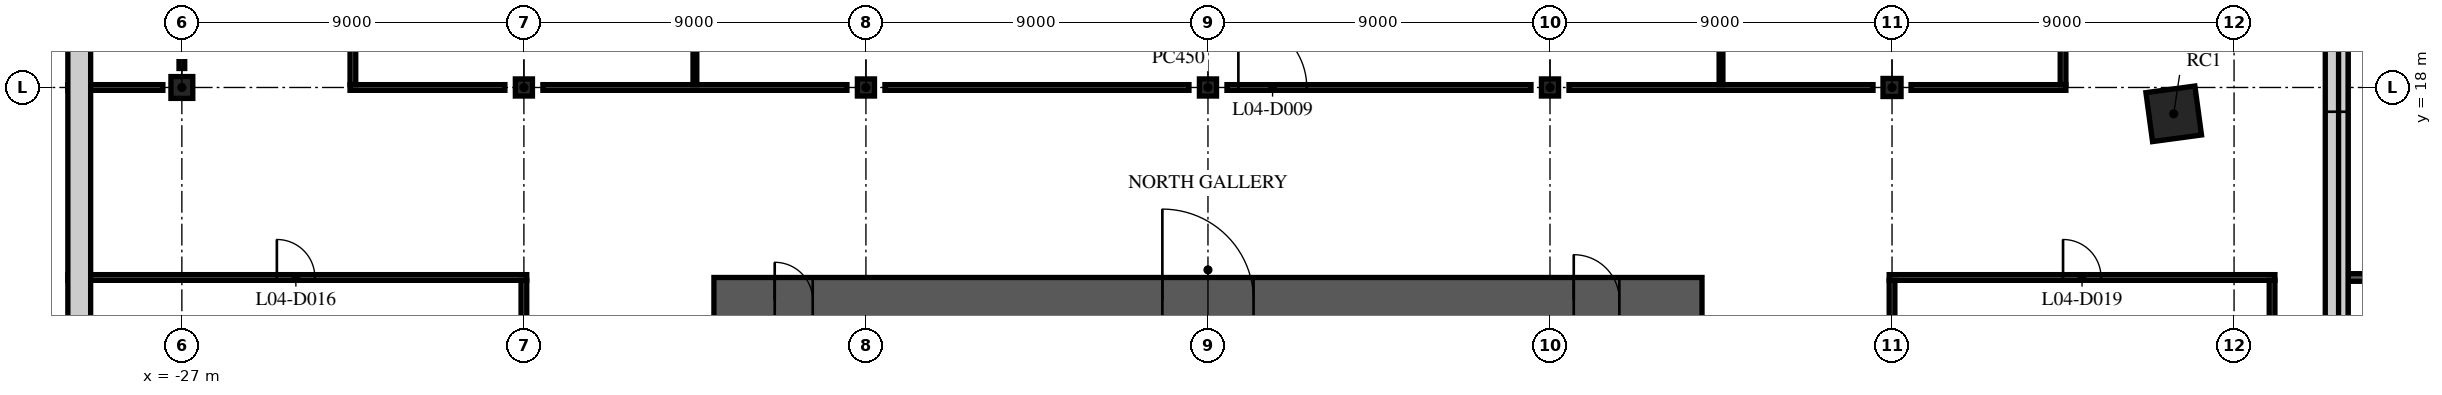
"""IFC4 building model, lengths in metres.
Left out: names, types, materials, properties, quantities, classifications, styles, units other than length and angle.
Written with IfcOpenShell. Run it as: python <this file> out.ifc"""

import sys

from ifc_helpers import new_model, si_unit, direction, frame, frame_2d, origin, origin_2d, place, context, subcontext, project, spatial, rectangle, extrude, element, fill, save


model = new_model("IFC4")
c1 = context("Model", 3, precision=1e-05, world=origin(), true_north=direction((0.0, 1.0)))
c2 = subcontext(c1, "Body", "Model", "MODEL_VIEW")
j1 = project(units=[si_unit("LENGTHUNIT", "METRE"), si_unit("PLANEANGLEUNIT", "RADIAN")], contexts=[c1])
p1 = place(None, origin())
s1 = spatial("IfcSite", under=j1, at=p1, CompositionType="ELEMENT")
p2 = place(p1, origin())
s2 = spatial("IfcBuilding", under=s1, at=p2, CompositionType="ELEMENT")
p3 = place(p2, frame((0.0, 0.0, 18.0)))
s3 = spatial("IfcBuildingStorey", under=s2, at=p3, CompositionType="ELEMENT", Elevation=18.0)
p4 = place(p3, frame((-27.0, 18.0, 0.0), z_axis=(0.0, 0.0, 1.0), x_axis=(1.0, 0.0, 0.0)))
e1 = element("IfcColumn", 1, at=p4, inside=s3, PredefinedType="COLUMN", context=c2, shape_type="SweptSolid", body=[
    extrude(rectangle(XDim=0.575, YDim=0.575, at=origin_2d()), origin(), (0.0, 0.0, 1.0), 4.5),
])
for number, where, z_axis, x_axis in (
    (2, (-18.0, 18.0, 0.0), (0.0, 0.0, 1.0), (1.0, 0.0, 0.0)),
    (3, (-9.0, 18.0, 0.0), (0.0, 0.0, 1.0), (1.0, 0.0, 0.0)),
    (4, (0.0, 18.0, 0.0), (0.0, 0.0, 1.0), (1.0, 0.0, 0.0)),
    (5, (9.0, 18.0, 0.0), (0.0, 0.0, 1.0), (1.0, 0.0, 0.0)),
):
    element("IfcColumn", number, at=place(p3, frame(where, z_axis=z_axis, x_axis=x_axis)), inside=s3, PredefinedType="COLUMN", context=c2, shape_type="SweptSolid", body=[
        extrude(rectangle(XDim=0.45, YDim=0.45, at=origin_2d()), origin(), (0.0, 0.0, 1.0), 4.5),
    ])
p5 = place(p3, frame((18.0, 18.0, 0.0), z_axis=(0.0, 0.0, 1.0), x_axis=(1.0, 0.0, 0.0)))
e6 = element("IfcColumn", 6, at=p5, inside=s3, PredefinedType="COLUMN", context=c2, shape_type="SweptSolid", body=[
    extrude(rectangle(XDim=0.475, YDim=0.475, at=origin_2d()), origin(), (0.0, 0.0, 1.0), 4.5),
])
p6 = place(p3, frame((25.412, 17.307, 0.0), z_axis=(0.0, 0.0, 1.0), x_axis=(0.991001197216, 0.133853005627, 0.0)))
e7 = element("IfcColumn", 7, at=p6, inside=s3, PredefinedType="COLUMN", context=c2, shape_type="SweptSolid", body=[
    extrude(rectangle(XDim=1.3, YDim=1.3, at=origin_2d()), origin(), (0.0, 0.0, 1.0), 4.5),
])
p7 = place(p3, frame((-13.0, 12.4, 0.0), z_axis=(0.0, 0.0, 1.0), x_axis=(1.0, 0.0, 0.0)))
e8 = element("IfcWall", 8, at=p7, inside=s3, PredefinedType="SHEAR", context=c2, shape_type="SweptSolid", body=[
    extrude(rectangle(XDim=26.0, YDim=1.2, at=frame_2d((13.0, 0.0))), origin(), (0.0, 0.0, 1.0), 4.05),
])
p8 = place(p7, frame((11.8, 0.0, 0.0)))
e9 = element("IfcOpeningElement", 9, at=p8, cuts=e8, PredefinedType="OPENING", context=c2, shape_type="SweptSolid", body=[
    extrude(rectangle(XDim=2.4, YDim=2.4, at=frame_2d((1.2, 1.2))), frame((0.0, 0.61, 0.0), z_axis=(0.0, -1.0, 0.0), x_axis=(1.0, 0.0, 0.0)), (0.0, 0.0, 1.0), 1.22),
])
p9 = place(p7, frame((22.625, 0.0, 0.0)))
e10 = element("IfcOpeningElement", 10, at=p9, cuts=e8, PredefinedType="OPENING", context=c2, shape_type="SweptSolid", body=[
    extrude(rectangle(XDim=1.2, YDim=2.1, at=frame_2d((0.6, 1.05))), frame((0.0, 0.61, 0.0), z_axis=(0.0, -1.0, 0.0), x_axis=(1.0, 0.0, 0.0)), (0.0, 0.0, 1.0), 1.22),
])
p10 = place(p7, frame((1.6, 0.0, 0.0)))
e11 = element("IfcOpeningElement", 11, at=p10, cuts=e8, PredefinedType="OPENING", context=c2, shape_type="SweptSolid", body=[
    extrude(rectangle(XDim=1.0, YDim=2.1, at=frame_2d((0.5, 1.05))), frame((0.0, 0.61, 0.0), z_axis=(0.0, -1.0, 0.0), x_axis=(1.0, 0.0, 0.0)), (0.0, 0.0, 1.0), 1.22),
])
p11 = place(p3, frame((-30.0, 13.0, 0.0), z_axis=(0.0, 0.0, 1.0), x_axis=(1.0, 0.0, 0.0)))
e12 = element("IfcWall", 12, at=p11, inside=s3, PredefinedType="PARTITIONING", context=c2, shape_type="SweptSolid", body=[
    extrude(rectangle(XDim=12.075, YDim=0.15, at=frame_2d((6.038, 0.0))), origin(), (0.0, 0.0, 1.0), 3.23),
])
p12 = place(p11, frame((5.5, 0.0, 0.0)))
e13 = element("IfcOpeningElement", 13, at=p12, cuts=e12, PredefinedType="OPENING", context=c2, shape_type="SweptSolid", body=[
    extrude(rectangle(XDim=1.0, YDim=2.1, at=frame_2d((0.5, 1.05))), frame((0.0, 0.085, 0.0), z_axis=(0.0, -1.0, 0.0), x_axis=(1.0, 0.0, 0.0)), (0.0, 0.0, 1.0), 0.17),
])
p13 = place(p3, frame((17.925, 13.0, 0.0), z_axis=(0.0, 0.0, 1.0), x_axis=(1.0, 0.0, 0.0)))
e14 = element("IfcWall", 14, at=p13, inside=s3, PredefinedType="PARTITIONING", context=c2, shape_type="SweptSolid", body=[
    extrude(rectangle(XDim=10.15, YDim=0.15, at=frame_2d((5.075, 0.0))), origin(), (0.0, 0.0, 1.0), 3.23),
])
p14 = place(p13, frame((4.575, 0.0, 0.0)))
e15 = element("IfcOpeningElement", 15, at=p14, cuts=e14, PredefinedType="OPENING", context=c2, shape_type="SweptSolid", body=[
    extrude(rectangle(XDim=1.0, YDim=2.1, at=frame_2d((0.5, 1.05))), frame((0.0, 0.085, 0.0), z_axis=(0.0, -1.0, 0.0), x_axis=(1.0, 0.0, 0.0)), (0.0, 0.0, 1.0), 0.17),
])
p15 = place(p3, frame((30.0, 13.0, 0.0), z_axis=(0.0, 0.0, 1.0), x_axis=(1.0, 0.0, 0.0)))
e16 = element("IfcWall", 16, at=p15, inside=s3, PredefinedType="PARTITIONING", context=c2, shape_type="SweptSolid", body=[
    extrude(rectangle(XDim=6.0, YDim=0.2, at=frame_2d((3.0, 0.0))), origin(), (0.0, 0.0, 1.0), 4.05),
])
p16 = place(p3, frame((-30.0, 18.0, 0.0), z_axis=(0.0, 0.0, 1.0), x_axis=(1.0, 0.0, 0.0)))
e17 = element("IfcWall", 17, at=p16, inside=s3, PredefinedType="PARTITIONING", context=c2, shape_type="SweptSolid", body=[
    extrude(rectangle(XDim=2.5, YDim=0.15, at=frame_2d((1.25, 0.0))), origin(), (0.0, 0.0, 1.0), 3.23),
])
p17 = place(p3, frame((-22.575, 18.0, 0.0), z_axis=(0.0, 0.0, 1.0), x_axis=(1.0, 0.0, 0.0)))
e18 = element("IfcWall", 18, at=p17, inside=s3, PredefinedType="PARTITIONING", context=c2, shape_type="SweptSolid", body=[
    extrude(rectangle(XDim=4.075, YDim=0.15, at=frame_2d((2.038, 0.0))), origin(), (0.0, 0.0, 1.0), 3.53),
])
for number, where, z_axis, x_axis in (
    (19, (-17.5, 18.0, 0.0), (0.0, 0.0, 1.0), (1.0, 0.0, 0.0)),
    (20, (-8.5, 18.0, 0.0), (0.0, 0.0, 1.0), (1.0, 0.0, 0.0)),
):
    element("IfcWall", number, at=place(p3, frame(where, z_axis=z_axis, x_axis=x_axis)), inside=s3, PredefinedType="PARTITIONING", context=c2, shape_type="SweptSolid", body=[
        extrude(rectangle(XDim=8.0, YDim=0.15, at=frame_2d((4.0, 0.0))), origin(), (0.0, 0.0, 1.0), 3.53),
    ])
p18 = place(p3, frame((0.5, 18.0, 0.0), z_axis=(0.0, 0.0, 1.0), x_axis=(1.0, 0.0, 0.0)))
e21 = element("IfcWall", 21, at=p18, inside=s3, PredefinedType="PARTITIONING", context=c2, shape_type="SweptSolid", body=[
    extrude(rectangle(XDim=8.0, YDim=0.15, at=frame_2d((4.0, 0.0))), origin(), (0.0, 0.0, 1.0), 3.53),
])
p19 = place(p18, frame((0.3, 0.0, 0.0)))
e22 = element("IfcOpeningElement", 22, at=p19, cuts=e21, PredefinedType="OPENING", context=c2, shape_type="SweptSolid", body=[
    extrude(rectangle(XDim=1.8, YDim=2.1, at=frame_2d((0.9, 1.05))), frame((0.0, 0.085, 0.0), z_axis=(0.0, -1.0, 0.0), x_axis=(1.0, 0.0, 0.0)), (0.0, 0.0, 1.0), 0.17),
])
p20 = place(p3, frame((9.5, 18.0, 0.0), z_axis=(0.0, 0.0, 1.0), x_axis=(1.0, 0.0, 0.0)))
e23 = element("IfcWall", 23, at=p20, inside=s3, PredefinedType="PARTITIONING", context=c2, shape_type="SweptSolid", body=[
    extrude(rectangle(XDim=8.0, YDim=0.15, at=frame_2d((4.0, 0.0))), origin(), (0.0, 0.0, 1.0), 3.53),
])
p21 = place(p3, frame((18.5, 18.0, 0.0), z_axis=(0.0, 0.0, 1.0), x_axis=(1.0, 0.0, 0.0)))
e24 = element("IfcWall", 24, at=p21, inside=s3, PredefinedType="PARTITIONING", context=c2, shape_type="SweptSolid", body=[
    extrude(rectangle(XDim=4.075, YDim=0.15, at=frame_2d((2.038, 0.0))), origin(), (0.0, 0.0, 1.0), 3.53),
])
p22 = place(p3, frame((-27.0, 18.5, 0.0), z_axis=(0.0, 0.0, 1.0), x_axis=(0.0, 1.0, 0.0)))
e25 = element("IfcWall", 25, at=p22, inside=s3, PredefinedType="PARTITIONING", context=c2, shape_type="SweptSolid", body=[
    extrude(rectangle(XDim=1.242, YDim=0.15, at=frame_2d((0.621, 0.0))), origin(), (0.0, 0.0, 1.0), 4.05),
])
p23 = place(p3, frame((-22.5, 18.075, 0.0), z_axis=(0.0, 0.0, 1.0), x_axis=(0.0, 1.0, 0.0)))
e26 = element("IfcWall", 26, at=p23, inside=s3, PredefinedType="PARTITIONING", context=c2, shape_type="SweptSolid", body=[
    extrude(rectangle(XDim=11.925, YDim=0.15, at=frame_2d((5.962, 0.0))), origin(), (0.0, 0.0, 1.0), 3.23),
])
p24 = place(p23, frame((5.425, 0.0, 0.0)))
e27 = element("IfcOpeningElement", 27, at=p24, cuts=e26, PredefinedType="OPENING", context=c2, shape_type="SweptSolid", body=[
    extrude(rectangle(XDim=1.0, YDim=2.1, at=frame_2d((0.5, 1.05))), frame((0.0, 0.085, 0.0), z_axis=(0.0, -1.0, 0.0), x_axis=(1.0, 0.0, 0.0)), (0.0, 0.0, 1.0), 0.17),
])
p25 = place(p3, frame((-18.0, 9.5, 0.0), z_axis=(0.0, 0.0, 1.0), x_axis=(0.0, 1.0, 0.0)))
e28 = element("IfcWall", 28, at=p25, inside=s3, PredefinedType="PARTITIONING", context=c2, shape_type="SweptSolid", body=[
    extrude(rectangle(XDim=3.425, YDim=0.15, at=frame_2d((1.712, 0.0))), origin(), (0.0, 0.0, 1.0), 3.53),
])
for number, where, z_axis, x_axis in (
    (29, (-13.5, 18.075, 0.0), (0.0, 0.0, 1.0), (0.0, 1.0, 0.0)),
    (30, (13.5, 18.075, 0.0), (0.0, 0.0, 1.0), (0.0, 1.0, 0.0)),
):
    element("IfcWall", number, at=place(p3, frame(where, z_axis=z_axis, x_axis=x_axis)), inside=s3, PredefinedType="PARTITIONING", context=c2, shape_type="SweptSolid", body=[
        extrude(rectangle(XDim=11.925, YDim=0.1, at=frame_2d((5.962, 0.0))), origin(), (0.0, 0.0, 1.0), 3.23),
    ])
p26 = place(p3, frame((18.0, 9.5, 0.0), z_axis=(0.0, 0.0, 1.0), x_axis=(0.0, 1.0, 0.0)))
e31 = element("IfcWall", 31, at=p26, inside=s3, PredefinedType="PARTITIONING", context=c2, shape_type="SweptSolid", body=[
    extrude(rectangle(XDim=3.425, YDim=0.15, at=frame_2d((1.712, 0.0))), origin(), (0.0, 0.0, 1.0), 3.53),
])
p27 = place(p3, frame((22.5, 18.075, 0.0), z_axis=(0.0, 0.0, 1.0), x_axis=(0.0, 1.0, 0.0)))
e32 = element("IfcWall", 32, at=p27, inside=s3, PredefinedType="PARTITIONING", context=c2, shape_type="SweptSolid", body=[
    extrude(rectangle(XDim=11.925, YDim=0.15, at=frame_2d((5.962, 0.0))), origin(), (0.0, 0.0, 1.0), 3.23),
])
p28 = place(p27, frame((5.425, 0.0, 0.0)))
e33 = element("IfcOpeningElement", 33, at=p28, cuts=e32, PredefinedType="OPENING", context=c2, shape_type="SweptSolid", body=[
    extrude(rectangle(XDim=1.0, YDim=2.1, at=frame_2d((0.5, 1.05))), frame((0.0, 0.085, 0.0), z_axis=(0.0, -1.0, 0.0), x_axis=(1.0, 0.0, 0.0)), (0.0, 0.0, 1.0), 0.17),
])
p29 = place(p3, frame((28.0, 4.075, 0.0), z_axis=(0.0, 0.0, 1.0), x_axis=(0.0, 1.0, 0.0)))
e34 = element("IfcWall", 34, at=p29, inside=s3, PredefinedType="PARTITIONING", context=c2, shape_type="SweptSolid", body=[
    extrude(rectangle(XDim=8.85, YDim=0.15, at=frame_2d((4.425, 0.0))), origin(), (0.0, 0.0, 1.0), 4.05),
])
p30 = place(p3, frame((29.7, 3.65, 0.0), z_axis=(0.0, 0.0, 1.0), x_axis=(0.0, 1.0, 0.0)))
e35 = element("IfcWall", 35, at=p30, inside=s3, PredefinedType="STANDARD", context=c2, shape_type="SweptSolid", body=[
    extrude(rectangle(XDim=26.35, YDim=0.6, at=frame_2d((13.175, 0.0))), origin(), (0.0, 0.0, 1.0), 4.05),
])
p31 = place(p30, frame((4.481, 0.0, 0.9)))
e36 = element("IfcOpeningElement", 36, at=p31, cuts=e35, PredefinedType="OPENING", context=c2, shape_type="SweptSolid", body=[
    extrude(rectangle(XDim=2.2, YDim=3.0, at=frame_2d((1.1, 1.5))), frame((0.0, 0.31, 0.0), z_axis=(0.0, -1.0, 0.0), x_axis=(1.0, 0.0, 0.0)), (0.0, 0.0, 1.0), 0.62),
])
p32 = place(p30, frame((13.711, 0.0, 0.9)))
e37 = element("IfcOpeningElement", 37, at=p32, cuts=e35, PredefinedType="OPENING", context=c2, shape_type="SweptSolid", body=[
    extrude(rectangle(XDim=2.2, YDim=3.0, at=frame_2d((1.1, 1.5))), frame((0.0, 0.31, 0.0), z_axis=(0.0, -1.0, 0.0), x_axis=(1.0, 0.0, 0.0)), (0.0, 0.0, 1.0), 0.62),
])
p33 = place(p30, frame((22.942, 0.0, 0.9)))
e38 = element("IfcOpeningElement", 38, at=p33, cuts=e35, PredefinedType="OPENING", context=c2, shape_type="SweptSolid", body=[
    extrude(rectangle(XDim=2.2, YDim=3.0, at=frame_2d((1.1, 1.5))), frame((0.0, 0.31, 0.0), z_axis=(0.0, -1.0, 0.0), x_axis=(1.0, 0.0, 0.0)), (0.0, 0.0, 1.0), 0.62),
])
p34 = place(p3, frame((-29.7, 29.4, 0.0), z_axis=(0.0, 0.0, 1.0), x_axis=(0.0, -1.0, 0.0)))
e39 = element("IfcWall", 39, at=p34, inside=s3, PredefinedType="STANDARD", context=c2, shape_type="SweptSolid", body=[
    extrude(rectangle(XDim=28.0, YDim=0.6, at=frame_2d((14.0, 0.0))), origin(), (0.0, 0.0, 1.0), 4.05),
])
p35 = place(p34, frame((0.908, 0.0, 0.9)))
e40 = element("IfcOpeningElement", 40, at=p35, cuts=e39, PredefinedType="OPENING", context=c2, shape_type="SweptSolid", body=[
    extrude(rectangle(XDim=2.2, YDim=3.0, at=frame_2d((1.1, 1.5))), frame((0.0, 0.31, 0.0), z_axis=(0.0, -1.0, 0.0), x_axis=(1.0, 0.0, 0.0)), (0.0, 0.0, 1.0), 0.62),
])
p36 = place(p34, frame((5.223, 0.0, 0.9)))
e41 = element("IfcOpeningElement", 41, at=p36, cuts=e39, PredefinedType="OPENING", context=c2, shape_type="SweptSolid", body=[
    extrude(rectangle(XDim=2.2, YDim=3.0, at=frame_2d((1.1, 1.5))), frame((0.0, 0.31, 0.0), z_axis=(0.0, -1.0, 0.0), x_axis=(1.0, 0.0, 0.0)), (0.0, 0.0, 1.0), 0.62),
])
p37 = place(p3, frame((29.875, 7.453, 4.5), z_axis=(0.0, 0.0, 1.0), x_axis=(0.0, 1.0, 0.0)))
e42 = element("IfcWall", 42, at=p37, inside=s3, PredefinedType="PARAPET", context=c2, shape_type="SweptSolid", body=[
    extrude(rectangle(XDim=22.547, YDim=0.25, at=frame_2d((11.273, 0.0))), origin(), (0.0, 0.0, 1.0), 1.1),
])
p38 = place(p8, origin())
e43 = element("IfcDoor", 43, at=p38, inside=s3, OperationType="SINGLE_SWING_LEFT", PredefinedType="DOOR", context=c2, shape_type="SweptSolid", body=[
    extrude(rectangle(XDim=2.4, YDim=2.4, at=frame_2d((1.2, 1.2))), frame((0.0, 0.025, 0.0), z_axis=(0.0, -1.0, 0.0), x_axis=(1.0, 0.0, 0.0)), (0.0, 0.0, 1.0), 0.05),
])
fill(e9, e43)
p39 = place(p9, origin())
e44 = element("IfcDoor", 44, at=p39, inside=s3, OperationType="SINGLE_SWING_LEFT", PredefinedType="DOOR", context=c2, shape_type="SweptSolid", body=[
    extrude(rectangle(XDim=1.2, YDim=2.1, at=frame_2d((0.6, 1.05))), frame((0.0, 0.025, 0.0), z_axis=(0.0, -1.0, 0.0), x_axis=(1.0, 0.0, 0.0)), (0.0, 0.0, 1.0), 0.05),
])
fill(e10, e44)
p40 = place(p10, origin())
e45 = element("IfcDoor", 45, at=p40, inside=s3, OperationType="SINGLE_SWING_LEFT", PredefinedType="DOOR", context=c2, shape_type="SweptSolid", body=[
    extrude(rectangle(XDim=1.0, YDim=2.1, at=frame_2d((0.5, 1.05))), frame((0.0, 0.025, 0.0), z_axis=(0.0, -1.0, 0.0), x_axis=(1.0, 0.0, 0.0)), (0.0, 0.0, 1.0), 0.05),
])
fill(e11, e45)
p41 = place(p19, origin())
e46 = element("IfcDoor", 46, at=p41, inside=s3, OperationType="DOUBLE_DOOR_SINGLE_SWING", PredefinedType="DOOR", context=c2, shape_type="SweptSolid", body=[
    extrude(rectangle(XDim=1.8, YDim=2.1, at=frame_2d((0.9, 1.05))), frame((0.0, 0.025, 0.0), z_axis=(0.0, -1.0, 0.0), x_axis=(1.0, 0.0, 0.0)), (0.0, 0.0, 1.0), 0.05),
])
fill(e22, e46)
p42 = place(p12, origin())
e47 = element("IfcDoor", 47, at=p42, inside=s3, OperationType="SINGLE_SWING_RIGHT", PredefinedType="DOOR", context=c2, shape_type="SweptSolid", body=[
    extrude(rectangle(XDim=1.0, YDim=2.1, at=frame_2d((0.5, 1.05))), frame((0.0, 0.025, 0.0), z_axis=(0.0, -1.0, 0.0), x_axis=(1.0, 0.0, 0.0)), (0.0, 0.0, 1.0), 0.05),
])
fill(e13, e47)
p43 = place(p14, origin())
e48 = element("IfcDoor", 48, at=p43, inside=s3, OperationType="SINGLE_SWING_LEFT", PredefinedType="DOOR", context=c2, shape_type="SweptSolid", body=[
    extrude(rectangle(XDim=1.0, YDim=2.1, at=frame_2d((0.5, 1.05))), frame((0.0, 0.025, 0.0), z_axis=(0.0, -1.0, 0.0), x_axis=(1.0, 0.0, 0.0)), (0.0, 0.0, 1.0), 0.05),
])
fill(e15, e48)
p44 = place(p32, origin())
e49 = element("IfcWindow", 49, at=p44, inside=s3, PartitioningType="SINGLE_PANEL", PredefinedType="WINDOW", context=c2, shape_type="SweptSolid", body=[
    extrude(rectangle(XDim=2.2, YDim=3.0, at=frame_2d((1.1, 1.5))), frame((0.0, 0.03, 0.0), z_axis=(0.0, -1.0, 0.0), x_axis=(1.0, 0.0, 0.0)), (0.0, 0.0, 1.0), 0.06),
])
fill(e37, e49)
save(model, sys.argv[1])
